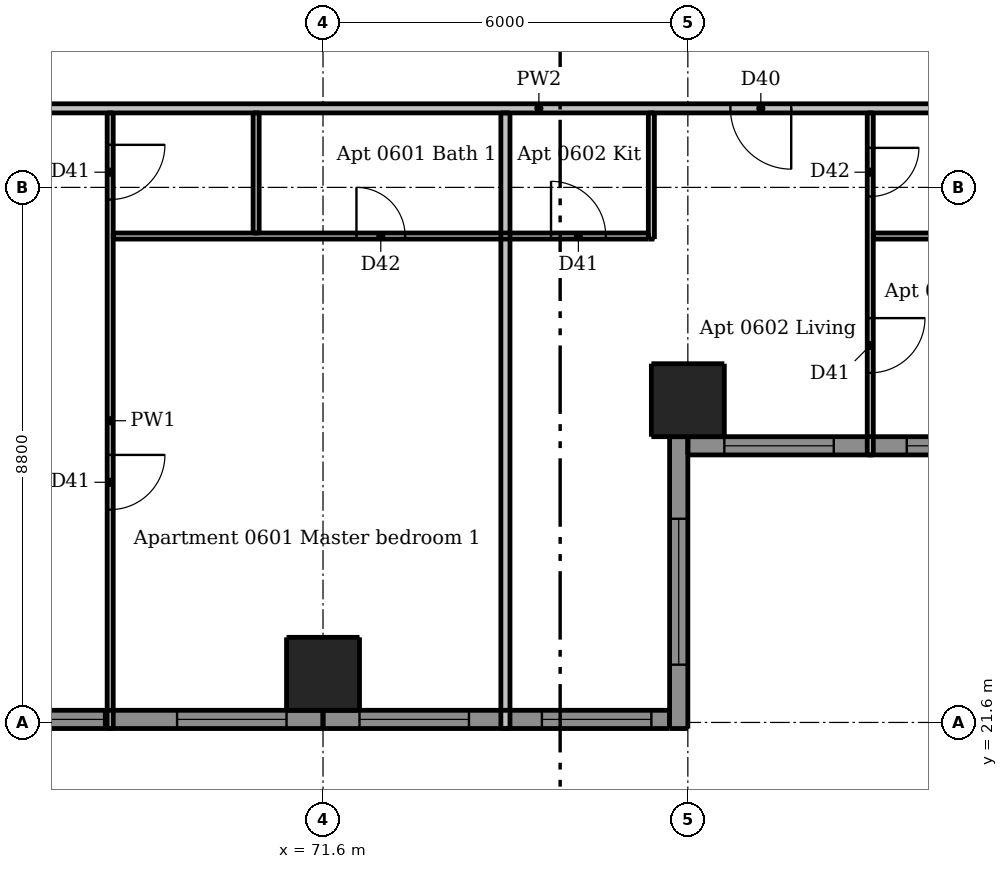
"""IFC4 building model, lengths in metres.
Left out: names, types, materials, properties, quantities, classifications, styles, units other than length and angle.
Written with IfcOpenShell. Run it as: python <this file> out.ifc"""

import sys

from ifc_helpers import new_model, si_unit, direction, frame, frame_2d, origin, origin_2d, place, context, subcontext, project, spatial, rectangle, extrude, element, fill, save


model = new_model("IFC4")
c1 = context("Model", 3, precision=1e-05, world=origin(), true_north=direction((0.0, 1.0)))
c2 = subcontext(c1, "Body", "Model", "MODEL_VIEW")
j1 = project(units=[si_unit("LENGTHUNIT", "METRE"), si_unit("PLANEANGLEUNIT", "RADIAN")], contexts=[c1])
p1 = place(None, origin())
s1 = spatial("IfcSite", under=j1, at=p1, CompositionType="ELEMENT")
p2 = place(p1, origin())
s2 = spatial("IfcBuilding", under=s1, at=p2, CompositionType="ELEMENT")
p3 = place(p2, frame((0.0, 0.0, 26.8)))
s3 = spatial("IfcBuildingStorey", under=s2, at=p3, CompositionType="ELEMENT", Elevation=26.8)
for number, where, z_axis, x_axis in (
    (1, (71.6, 22.4, 0.0), (0.0, 0.0, 1.0), (1.0, 0.0, 0.0)),
    (2, (77.6, 26.9, 0.0), (0.0, 0.0, 1.0), (1.0, 0.0, 0.0)),
):
    element("IfcColumn", number, at=place(p3, frame(where, z_axis=z_axis, x_axis=x_axis)), inside=s3, PredefinedType="COLUMN", context=c2, shape_type="SweptSolid", body=[
        extrude(rectangle(XDim=1.2, YDim=1.2, at=origin_2d()), origin(), (0.0, 0.0, 1.0), 3.05),
    ])
p4 = place(p3, frame((77.45, 21.5, 0.0), z_axis=(0.0, 0.0, 1.0), x_axis=(0.0, 1.0, 0.0)))
e3 = element("IfcWall", 3, at=p4, inside=s3, PredefinedType="SOLIDWALL", context=c2, shape_type="SweptSolid", body=[
    extrude(rectangle(XDim=4.8, YDim=0.3, at=frame_2d((2.4, 0.0))), origin(), (0.0, 0.0, 1.0), 3.05),
])
p5 = place(p4, frame((1.05, 0.0, 0.15)))
e4 = element("IfcOpeningElement", 4, at=p5, cuts=e3, PredefinedType="OPENING", context=c2, shape_type="SweptSolid", body=[
    extrude(rectangle(XDim=2.4, YDim=2.1, at=frame_2d((1.2, 1.05))), frame((0.0, 0.16, 0.0), z_axis=(0.0, -1.0, 0.0), x_axis=(1.0, 0.0, 0.0)), (0.0, 0.0, 1.0), 0.32),
])
p6 = place(p3, frame((65.6, 21.65, 0.0), z_axis=(0.0, 0.0, 1.0), x_axis=(1.0, 0.0, 0.0)))
e5 = element("IfcWall", 5, at=p6, inside=s3, PredefinedType="SOLIDWALL", context=c2, shape_type="SweptSolid", body=[
    extrude(rectangle(XDim=6.0, YDim=0.3, at=frame_2d((3.0, 0.0))), origin(), (0.0, 0.0, 1.0), 3.05),
])
p7 = place(p6, frame((0.6, 0.0, 0.15)))
e6 = element("IfcOpeningElement", 6, at=p7, cuts=e5, PredefinedType="OPENING", context=c2, shape_type="SweptSolid", body=[
    extrude(rectangle(XDim=1.8, YDim=2.1, at=frame_2d((0.9, 1.05))), frame((0.0, 0.16, 0.0), z_axis=(0.0, -1.0, 0.0), x_axis=(1.0, 0.0, 0.0)), (0.0, 0.0, 1.0), 0.32),
])
p8 = place(p6, frame((3.6, 0.0, 0.15)))
e7 = element("IfcOpeningElement", 7, at=p8, cuts=e5, PredefinedType="OPENING", context=c2, shape_type="SweptSolid", body=[
    extrude(rectangle(XDim=1.8, YDim=2.1, at=frame_2d((0.9, 1.05))), frame((0.0, 0.16, 0.0), z_axis=(0.0, -1.0, 0.0), x_axis=(1.0, 0.0, 0.0)), (0.0, 0.0, 1.0), 0.32),
])
p9 = place(p3, frame((71.6, 21.65, 0.0), z_axis=(0.0, 0.0, 1.0), x_axis=(1.0, 0.0, 0.0)))
e8 = element("IfcWall", 8, at=p9, inside=s3, PredefinedType="SOLIDWALL", context=c2, shape_type="SweptSolid", body=[
    extrude(rectangle(XDim=5.7, YDim=0.3, at=frame_2d((2.85, 0.0))), origin(), (0.0, 0.0, 1.0), 3.05),
])
p10 = place(p9, frame((0.6, 0.0, 0.15)))
e9 = element("IfcOpeningElement", 9, at=p10, cuts=e8, PredefinedType="OPENING", context=c2, shape_type="SweptSolid", body=[
    extrude(rectangle(XDim=1.8, YDim=2.1, at=frame_2d((0.9, 1.05))), frame((0.0, 0.16, 0.0), z_axis=(0.0, -1.0, 0.0), x_axis=(1.0, 0.0, 0.0)), (0.0, 0.0, 1.0), 0.32),
])
p11 = place(p9, frame((3.6, 0.0, 0.15)))
e10 = element("IfcOpeningElement", 10, at=p11, cuts=e8, PredefinedType="OPENING", context=c2, shape_type="SweptSolid", body=[
    extrude(rectangle(XDim=1.8, YDim=2.1, at=frame_2d((0.9, 1.05))), frame((0.0, 0.16, 0.0), z_axis=(0.0, -1.0, 0.0), x_axis=(1.0, 0.0, 0.0)), (0.0, 0.0, 1.0), 0.32),
])
p12 = place(p3, frame((77.6, 26.15, 0.0), z_axis=(0.0, 0.0, 1.0), x_axis=(1.0, 0.0, 0.0)))
e11 = element("IfcWall", 11, at=p12, inside=s3, PredefinedType="SOLIDWALL", context=c2, shape_type="SweptSolid", body=[
    extrude(rectangle(XDim=6.0, YDim=0.3, at=frame_2d((3.0, 0.0))), origin(), (0.0, 0.0, 1.0), 3.05),
])
p13 = place(p12, frame((0.6, 0.0, 0.15)))
e12 = element("IfcOpeningElement", 12, at=p13, cuts=e11, PredefinedType="OPENING", context=c2, shape_type="SweptSolid", body=[
    extrude(rectangle(XDim=1.8, YDim=2.1, at=frame_2d((0.9, 1.05))), frame((0.0, 0.16, 0.0), z_axis=(0.0, -1.0, 0.0), x_axis=(1.0, 0.0, 0.0)), (0.0, 0.0, 1.0), 0.32),
])
p14 = place(p12, frame((3.6, 0.0, 0.15)))
e13 = element("IfcOpeningElement", 13, at=p14, cuts=e11, PredefinedType="OPENING", context=c2, shape_type="SweptSolid", body=[
    extrude(rectangle(XDim=1.8, YDim=2.1, at=frame_2d((0.9, 1.05))), frame((0.0, 0.16, 0.0), z_axis=(0.0, -1.0, 0.0), x_axis=(1.0, 0.0, 0.0)), (0.0, 0.0, 1.0), 0.32),
])
p15 = place(p3, frame((68.1, 31.625, 0.0), z_axis=(0.0, 0.0, 1.0), x_axis=(0.0, -1.0, 0.0)))
e14 = element("IfcWall", 14, at=p15, inside=s3, PredefinedType="PARTITIONING", context=c2, shape_type="SweptSolid", body=[
    extrude(rectangle(XDim=10.125, YDim=0.1, at=frame_2d((5.062, 0.0))), origin(), (0.0, 0.0, 1.0), 3.05),
])
p16 = place(p15, frame((0.525, 0.0, 0.0)))
e15 = element("IfcOpeningElement", 15, at=p16, cuts=e14, PredefinedType="OPENING", context=c2, shape_type="SweptSolid", body=[
    extrude(rectangle(XDim=0.9, YDim=2.1, at=frame_2d((0.45, 1.05))), frame((0.0, 0.06, 0.0), z_axis=(0.0, -1.0, 0.0), x_axis=(1.0, 0.0, 0.0)), (0.0, 0.0, 1.0), 0.12),
])
p17 = place(p15, frame((5.625, 0.0, 0.0)))
e16 = element("IfcOpeningElement", 16, at=p17, cuts=e14, PredefinedType="OPENING", context=c2, shape_type="SweptSolid", body=[
    extrude(rectangle(XDim=0.9, YDim=2.1, at=frame_2d((0.45, 1.05))), frame((0.0, 0.06, 0.0), z_axis=(0.0, -1.0, 0.0), x_axis=(1.0, 0.0, 0.0)), (0.0, 0.0, 1.0), 0.12),
])
p18 = place(p3, frame((70.5, 29.65, 0.0), z_axis=(0.0, 0.0, 1.0), x_axis=(0.0, 1.0, 0.0)))
e17 = element("IfcWall", 17, at=p18, inside=s3, PredefinedType="PARTITIONING", context=c2, shape_type="SweptSolid", body=[
    extrude(rectangle(XDim=1.975, YDim=0.1, at=frame_2d((0.988, 0.0))), origin(), (0.0, 0.0, 1.0), 3.05),
])
p19 = place(p3, frame((77.0, 29.55, 0.0), z_axis=(0.0, 0.0, 1.0), x_axis=(0.0, 1.0, 0.0)))
e18 = element("IfcWall", 18, at=p19, inside=s3, PredefinedType="PARTITIONING", context=c2, shape_type="SweptSolid", body=[
    extrude(rectangle(XDim=2.075, YDim=0.1, at=frame_2d((1.038, 0.0))), origin(), (0.0, 0.0, 1.0), 3.05),
])
p20 = place(p3, frame((80.6, 31.625, 0.0), z_axis=(0.0, 0.0, 1.0), x_axis=(0.0, -1.0, 0.0)))
e19 = element("IfcWall", 19, at=p20, inside=s3, PredefinedType="PARTITIONING", context=c2, shape_type="SweptSolid", body=[
    extrude(rectangle(XDim=5.625, YDim=0.1, at=frame_2d((2.812, 0.0))), origin(), (0.0, 0.0, 1.0), 3.05),
])
p21 = place(p20, frame((3.375, 0.0, 0.0)))
e20 = element("IfcOpeningElement", 20, at=p21, cuts=e19, PredefinedType="OPENING", context=c2, shape_type="SweptSolid", body=[
    extrude(rectangle(XDim=0.9, YDim=2.1, at=frame_2d((0.45, 1.05))), frame((0.0, 0.06, 0.0), z_axis=(0.0, -1.0, 0.0), x_axis=(1.0, 0.0, 0.0)), (0.0, 0.0, 1.0), 0.12),
])
p22 = place(p20, frame((0.575, 0.0, 0.0)))
e21 = element("IfcOpeningElement", 21, at=p22, cuts=e19, PredefinedType="OPENING", context=c2, shape_type="SweptSolid", body=[
    extrude(rectangle(XDim=0.8, YDim=2.1, at=frame_2d((0.4, 1.05))), frame((0.0, 0.06, 0.0), z_axis=(0.0, -1.0, 0.0), x_axis=(1.0, 0.0, 0.0)), (0.0, 0.0, 1.0), 0.12),
])
p23 = place(p3, frame((68.15, 29.6, 0.0), z_axis=(0.0, 0.0, 1.0), x_axis=(1.0, 0.0, 0.0)))
e22 = element("IfcWall", 22, at=p23, inside=s3, PredefinedType="PARTITIONING", context=c2, shape_type="SweptSolid", body=[
    extrude(rectangle(XDim=8.8, YDim=0.1, at=frame_2d((4.4, 0.0))), origin(), (0.0, 0.0, 1.0), 3.05),
])
p24 = place(p23, frame((4.0, 0.0, 0.0)))
e23 = element("IfcOpeningElement", 23, at=p24, cuts=e22, PredefinedType="OPENING", context=c2, shape_type="SweptSolid", body=[
    extrude(rectangle(XDim=0.8, YDim=2.1, at=frame_2d((0.4, 1.05))), frame((0.0, 0.06, 0.0), z_axis=(0.0, -1.0, 0.0), x_axis=(1.0, 0.0, 0.0)), (0.0, 0.0, 1.0), 0.12),
])
p25 = place(p23, frame((7.2, 0.0, 0.0)))
e24 = element("IfcOpeningElement", 24, at=p25, cuts=e22, PredefinedType="OPENING", context=c2, shape_type="SweptSolid", body=[
    extrude(rectangle(XDim=0.9, YDim=2.1, at=frame_2d((0.45, 1.05))), frame((0.0, 0.06, 0.0), z_axis=(0.0, -1.0, 0.0), x_axis=(1.0, 0.0, 0.0)), (0.0, 0.0, 1.0), 0.12),
])
p26 = place(p3, frame((80.65, 29.6, 0.0), z_axis=(0.0, 0.0, 1.0), x_axis=(1.0, 0.0, 0.0)))
e25 = element("IfcWall", 25, at=p26, inside=s3, PredefinedType="PARTITIONING", context=c2, shape_type="SweptSolid", body=[
    extrude(rectangle(XDim=5.0, YDim=0.1, at=frame_2d((2.5, 0.0))), origin(), (0.0, 0.0, 1.0), 3.05),
])
p27 = place(p26, frame((3.55, 0.0, 0.0)))
e26 = element("IfcOpeningElement", 26, at=p27, cuts=e25, PredefinedType="OPENING", context=c2, shape_type="SweptSolid", body=[
    extrude(rectangle(XDim=0.9, YDim=2.1, at=frame_2d((0.45, 1.05))), frame((0.0, 0.06, 0.0), z_axis=(0.0, -1.0, 0.0), x_axis=(1.0, 0.0, 0.0)), (0.0, 0.0, 1.0), 0.12),
])
p28 = place(p3, frame((74.6, 21.5, 0.0), z_axis=(0.0, 0.0, 1.0), x_axis=(0.0, 1.0, 0.0)))
e27 = element("IfcWall", 27, at=p28, inside=s3, PredefinedType="PARTITIONING", context=c2, shape_type="SweptSolid", body=[
    extrude(rectangle(XDim=10.125, YDim=0.15, at=frame_2d((5.062, 0.0))), origin(), (0.0, 0.0, 1.0), 3.05),
])
p29 = place(p3, frame((89.525, 31.7, 0.0), z_axis=(0.0, 0.0, 1.0), x_axis=(-1.0, 0.0, 0.0)))
e28 = element("IfcWall", 28, at=p29, inside=s3, PredefinedType="PARTITIONING", context=c2, shape_type="SweptSolid", body=[
    extrude(rectangle(XDim=28.75, YDim=0.15, at=frame_2d((14.375, 0.0))), origin(), (0.0, 0.0, 1.0), 3.05),
])
p30 = place(p29, frame((24.625, 0.0, 0.0)))
e29 = element("IfcOpeningElement", 29, at=p30, cuts=e28, PredefinedType="OPENING", context=c2, shape_type="SweptSolid", body=[
    extrude(rectangle(XDim=1.0, YDim=2.1, at=frame_2d((0.5, 1.05))), frame((0.0, 0.085, 0.0), z_axis=(0.0, -1.0, 0.0), x_axis=(1.0, 0.0, 0.0)), (0.0, 0.0, 1.0), 0.17),
])
p31 = place(p29, frame((10.225, 0.0, 0.0)))
e30 = element("IfcOpeningElement", 30, at=p31, cuts=e28, PredefinedType="OPENING", context=c2, shape_type="SweptSolid", body=[
    extrude(rectangle(XDim=1.0, YDim=2.1, at=frame_2d((0.5, 1.05))), frame((0.0, 0.085, 0.0), z_axis=(0.0, -1.0, 0.0), x_axis=(1.0, 0.0, 0.0)), (0.0, 0.0, 1.0), 0.17),
])
p32 = place(p29, frame((2.425, 0.0, 0.0)))
e31 = element("IfcOpeningElement", 31, at=p32, cuts=e28, PredefinedType="OPENING", context=c2, shape_type="SweptSolid", body=[
    extrude(rectangle(XDim=1.0, YDim=2.1, at=frame_2d((0.5, 1.05))), frame((0.0, 0.085, 0.0), z_axis=(0.0, -1.0, 0.0), x_axis=(1.0, 0.0, 0.0)), (0.0, 0.0, 1.0), 0.17),
])
p33 = place(p5, origin())
e32 = element("IfcWindow", 32, at=p33, inside=s3, PartitioningType="DOUBLE_PANEL_VERTICAL", PredefinedType="WINDOW", context=c2, shape_type="SweptSolid", body=[
    extrude(rectangle(XDim=2.4, YDim=2.1, at=frame_2d((1.2, 1.05))), frame((0.0, 0.03, 0.0), z_axis=(0.0, -1.0, 0.0), x_axis=(1.0, 0.0, 0.0)), (0.0, 0.0, 1.0), 0.06),
])
fill(e4, e32)
p34 = place(p7, origin())
e33 = element("IfcWindow", 33, at=p34, inside=s3, PartitioningType="DOUBLE_PANEL_VERTICAL", PredefinedType="WINDOW", context=c2, shape_type="SweptSolid", body=[
    extrude(rectangle(XDim=1.8, YDim=2.1, at=frame_2d((0.9, 1.05))), frame((0.0, 0.03, 0.0), z_axis=(0.0, -1.0, 0.0), x_axis=(1.0, 0.0, 0.0)), (0.0, 0.0, 1.0), 0.06),
])
fill(e6, e33)
p35 = place(p8, origin())
e34 = element("IfcWindow", 34, at=p35, inside=s3, PartitioningType="DOUBLE_PANEL_VERTICAL", PredefinedType="WINDOW", context=c2, shape_type="SweptSolid", body=[
    extrude(rectangle(XDim=1.8, YDim=2.1, at=frame_2d((0.9, 1.05))), frame((0.0, 0.03, 0.0), z_axis=(0.0, -1.0, 0.0), x_axis=(1.0, 0.0, 0.0)), (0.0, 0.0, 1.0), 0.06),
])
fill(e7, e34)
p36 = place(p10, origin())
e35 = element("IfcWindow", 35, at=p36, inside=s3, PartitioningType="DOUBLE_PANEL_VERTICAL", PredefinedType="WINDOW", context=c2, shape_type="SweptSolid", body=[
    extrude(rectangle(XDim=1.8, YDim=2.1, at=frame_2d((0.9, 1.05))), frame((0.0, 0.03, 0.0), z_axis=(0.0, -1.0, 0.0), x_axis=(1.0, 0.0, 0.0)), (0.0, 0.0, 1.0), 0.06),
])
fill(e9, e35)
p37 = place(p11, origin())
e36 = element("IfcWindow", 36, at=p37, inside=s3, PartitioningType="DOUBLE_PANEL_VERTICAL", PredefinedType="WINDOW", context=c2, shape_type="SweptSolid", body=[
    extrude(rectangle(XDim=1.8, YDim=2.1, at=frame_2d((0.9, 1.05))), frame((0.0, 0.03, 0.0), z_axis=(0.0, -1.0, 0.0), x_axis=(1.0, 0.0, 0.0)), (0.0, 0.0, 1.0), 0.06),
])
fill(e10, e36)
p38 = place(p13, origin())
e37 = element("IfcWindow", 37, at=p38, inside=s3, PartitioningType="DOUBLE_PANEL_VERTICAL", PredefinedType="WINDOW", context=c2, shape_type="SweptSolid", body=[
    extrude(rectangle(XDim=1.8, YDim=2.1, at=frame_2d((0.9, 1.05))), frame((0.0, 0.03, 0.0), z_axis=(0.0, -1.0, 0.0), x_axis=(1.0, 0.0, 0.0)), (0.0, 0.0, 1.0), 0.06),
])
fill(e12, e37)
p39 = place(p14, origin())
e38 = element("IfcWindow", 38, at=p39, inside=s3, PartitioningType="DOUBLE_PANEL_VERTICAL", PredefinedType="WINDOW", context=c2, shape_type="SweptSolid", body=[
    extrude(rectangle(XDim=1.8, YDim=2.1, at=frame_2d((0.9, 1.05))), frame((0.0, 0.03, 0.0), z_axis=(0.0, -1.0, 0.0), x_axis=(1.0, 0.0, 0.0)), (0.0, 0.0, 1.0), 0.06),
])
fill(e13, e38)
p40 = place(p16, origin())
e39 = element("IfcDoor", 39, at=p40, inside=s3, OperationType="SINGLE_SWING_LEFT", PredefinedType="DOOR", context=c2, shape_type="SweptSolid", body=[
    extrude(rectangle(XDim=0.9, YDim=2.1, at=frame_2d((0.45, 1.05))), frame((0.0, 0.025, 0.0), z_axis=(0.0, -1.0, 0.0), x_axis=(1.0, 0.0, 0.0)), (0.0, 0.0, 1.0), 0.05),
])
fill(e15, e39)
p41 = place(p17, origin())
e40 = element("IfcDoor", 40, at=p41, inside=s3, OperationType="SINGLE_SWING_LEFT", PredefinedType="DOOR", context=c2, shape_type="SweptSolid", body=[
    extrude(rectangle(XDim=0.9, YDim=2.1, at=frame_2d((0.45, 1.05))), frame((0.0, 0.025, 0.0), z_axis=(0.0, -1.0, 0.0), x_axis=(1.0, 0.0, 0.0)), (0.0, 0.0, 1.0), 0.05),
])
fill(e16, e40)
p42 = place(p24, origin())
e41 = element("IfcDoor", 41, at=p42, inside=s3, OperationType="SINGLE_SWING_LEFT", PredefinedType="DOOR", context=c2, shape_type="SweptSolid", body=[
    extrude(rectangle(XDim=0.8, YDim=2.1, at=frame_2d((0.4, 1.05))), frame((0.0, 0.025, 0.0), z_axis=(0.0, -1.0, 0.0), x_axis=(1.0, 0.0, 0.0)), (0.0, 0.0, 1.0), 0.05),
])
fill(e23, e41)
p43 = place(p31, origin())
e42 = element("IfcDoor", 42, at=p43, inside=s3, OperationType="SINGLE_SWING_LEFT", PredefinedType="DOOR", context=c2, shape_type="SweptSolid", body=[
    extrude(rectangle(XDim=1.0, YDim=2.1, at=frame_2d((0.5, 1.05))), frame((0.0, 0.025, 0.0), z_axis=(0.0, -1.0, 0.0), x_axis=(1.0, 0.0, 0.0)), (0.0, 0.0, 1.0), 0.05),
])
fill(e30, e42)
p44 = place(p25, origin())
e43 = element("IfcDoor", 43, at=p44, inside=s3, OperationType="SINGLE_SWING_LEFT", PredefinedType="DOOR", context=c2, shape_type="SweptSolid", body=[
    extrude(rectangle(XDim=0.9, YDim=2.1, at=frame_2d((0.45, 1.05))), frame((0.0, 0.025, 0.0), z_axis=(0.0, -1.0, 0.0), x_axis=(1.0, 0.0, 0.0)), (0.0, 0.0, 1.0), 0.05),
])
fill(e24, e43)
p45 = place(p21, origin())
e44 = element("IfcDoor", 44, at=p45, inside=s3, OperationType="SINGLE_SWING_LEFT", PredefinedType="DOOR", context=c2, shape_type="SweptSolid", body=[
    extrude(rectangle(XDim=0.9, YDim=2.1, at=frame_2d((0.45, 1.05))), frame((0.0, 0.025, 0.0), z_axis=(0.0, -1.0, 0.0), x_axis=(1.0, 0.0, 0.0)), (0.0, 0.0, 1.0), 0.05),
])
fill(e20, e44)
p46 = place(p22, origin())
e45 = element("IfcDoor", 45, at=p46, inside=s3, OperationType="SINGLE_SWING_LEFT", PredefinedType="DOOR", context=c2, shape_type="SweptSolid", body=[
    extrude(rectangle(XDim=0.8, YDim=2.1, at=frame_2d((0.4, 1.05))), frame((0.0, 0.025, 0.0), z_axis=(0.0, -1.0, 0.0), x_axis=(1.0, 0.0, 0.0)), (0.0, 0.0, 1.0), 0.05),
])
fill(e21, e45)
save(model, sys.argv[1])
